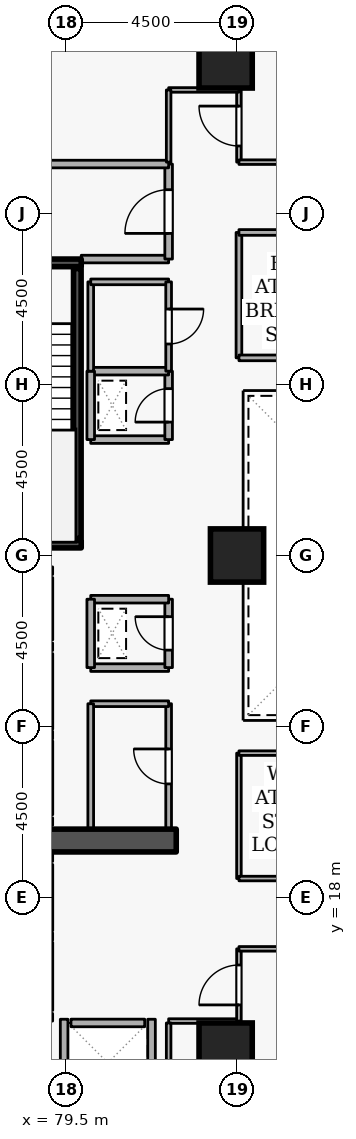
"""IFC4 building model, lengths in metres.
Left out: names, types, materials, properties, quantities, classifications, styles, units other than length and angle.
Written with IfcOpenShell. Run it as: python <this file> out.ifc"""

import sys

from ifc_helpers import new_model, si_unit, direction, frame, frame_2d, origin, origin_2d, place, context, subcontext, project, spatial, rectangle, extrude, element, fill, save


model = new_model("IFC4")
c1 = context("Model", 3, precision=1e-05, world=origin(), true_north=direction((0.0, 1.0)))
c2 = subcontext(c1, "Body", "Model", "MODEL_VIEW")
j1 = project(units=[si_unit("LENGTHUNIT", "METRE"), si_unit("PLANEANGLEUNIT", "RADIAN")], contexts=[c1])
p1 = place(None, origin())
s1 = spatial("IfcSite", under=j1, at=p1, CompositionType="ELEMENT")
p2 = place(p1, origin())
s2 = spatial("IfcBuilding", under=s1, at=p2, CompositionType="ELEMENT")
p3 = place(p2, frame((0.0, 0.0, 42.3)))
s3 = spatial("IfcBuildingStorey", under=s2, at=p3, CompositionType="ELEMENT", Elevation=42.3)
p4 = place(p3, frame((76.7, 19.5, 0.0), z_axis=(0.0, 0.0, 1.0), x_axis=(1.0, 0.0, 0.0)))
e1 = element("IfcWall", 1, at=p4, inside=s3, PredefinedType="SHEAR", context=c2, shape_type="SweptSolid", body=[
    extrude(rectangle(XDim=5.7, YDim=0.6, at=frame_2d((2.85, 0.0))), origin(), (0.0, 0.0, 1.0), 3.6),
])
for number, where, z_axis, x_axis in (
    (2, (83.7, 14.0, 0.0), (0.0, 0.0, 1.0), (1.0, 0.0, 0.0)),
    (3, (83.7, 40.0, 0.0), (0.0, 0.0, 1.0), (1.0, 0.0, 0.0)),
    (4, (84.0, 27.0, 0.0), (0.0, 0.0, 1.0), (1.0, 0.0, 0.0)),
):
    element("IfcColumn", number, at=place(p3, frame(where, z_axis=z_axis, x_axis=x_axis)), inside=s3, PredefinedType="COLUMN", context=c2, shape_type="SweptSolid", body=[
        extrude(rectangle(XDim=1.4, YDim=1.4, at=origin_2d()), origin(), (0.0, 0.0, 1.0), 3.6),
    ])
p5 = place(p3, frame((79.05, 24.78, 0.0), z_axis=(0.0, 0.0, 1.0), x_axis=(0.0, 1.0, 0.0)))
e5 = element("IfcWall", 5, at=p5, inside=s3, PredefinedType="STANDARD", context=c2, shape_type="SweptSolid", body=[
    extrude(rectangle(XDim=1.64, YDim=0.2, at=frame_2d((0.82, 0.0))), origin(), (0.0, 0.0, 1.0), 3.34),
])
p6 = place(p5, frame((0.31, 0.0, 0.0)))
e6 = element("IfcOpeningElement", 6, at=p6, cuts=e5, PredefinedType="OPENING", context=c2, shape_type="SweptSolid", body=[
    extrude(rectangle(XDim=1.02, YDim=2.06, at=frame_2d((0.51, 1.03))), frame((0.0, 0.11, 0.0), z_axis=(0.0, -1.0, 0.0), x_axis=(1.0, 0.0, 0.0)), (0.0, 0.0, 1.0), 0.22),
])
p7 = place(p3, frame((79.05, 22.43, 0.0), z_axis=(0.0, 0.0, 1.0), x_axis=(0.0, 1.0, 0.0)))
e7 = element("IfcWall", 7, at=p7, inside=s3, PredefinedType="STANDARD", context=c2, shape_type="SweptSolid", body=[
    extrude(rectangle(XDim=1.99, YDim=0.2, at=frame_2d((0.995, 0.0))), origin(), (0.0, 0.0, 1.0), 3.34),
])
p8 = place(p3, frame((79.05, 20.18, 0.0), z_axis=(0.0, 0.0, 1.0), x_axis=(0.0, 1.0, 0.0)))
e8 = element("IfcWall", 8, at=p8, inside=s3, PredefinedType="STANDARD", context=c2, shape_type="SweptSolid", body=[
    extrude(rectangle(XDim=1.94, YDim=0.2, at=frame_2d((0.97, 0.0))), origin(), (0.0, 0.0, 1.0), 3.34),
])
p9 = place(p3, frame((79.05, 17.13, 0.0), z_axis=(0.0, 0.0, 1.0), x_axis=(0.0, 1.0, 0.0)))
e9 = element("IfcWall", 9, at=p9, inside=s3, PredefinedType="STANDARD", context=c2, shape_type="SweptSolid", body=[
    extrude(rectangle(XDim=1.74, YDim=0.2, at=frame_2d((0.87, 0.0))), origin(), (0.0, 0.0, 1.0), 3.34),
])
p10 = place(p3, frame((79.05, 15.03, 0.0), z_axis=(0.0, 0.0, 1.0), x_axis=(0.0, 1.0, 0.0)))
e10 = element("IfcWall", 10, at=p10, inside=s3, PredefinedType="STANDARD", context=c2, shape_type="SweptSolid", body=[
    extrude(rectangle(XDim=1.79, YDim=0.2, at=frame_2d((0.895, 0.0))), origin(), (0.0, 0.0, 1.0), 3.34),
])
p11 = place(p3, frame((79.63, 14.7, 0.0), z_axis=(0.0, 0.0, 1.0), x_axis=(1.0, 0.0, 0.0)))
e11 = element("IfcWall", 11, at=p11, inside=s3, PredefinedType="STANDARD", context=c2, shape_type="SweptSolid", body=[
    extrude(rectangle(XDim=1.94, YDim=0.2, at=frame_2d((0.97, 0.0))), origin(), (0.0, 0.0, 1.0), 3.34),
])
for number, where, z_axis, x_axis in (
    (12, (81.75, 12.612, 0.0), (0.0, 0.0, 1.0), (0.0, 1.0, 0.0)),
    (13, (79.45, 12.612, 0.0), (0.0, 0.0, 1.0), (0.0, 1.0, 0.0)),
):
    element("IfcWall", number, at=place(p3, frame(where, z_axis=z_axis, x_axis=x_axis)), inside=s3, PredefinedType="STANDARD", context=c2, shape_type="SweptSolid", body=[
        extrude(rectangle(XDim=2.186, YDim=0.2, at=frame_2d((1.093, 0.0))), origin(), (0.0, 0.0, 1.0), 3.34),
    ])
p12 = place(p3, frame((76.55, 34.7, 0.0), z_axis=(0.0, 0.0, 1.0), x_axis=(1.0, 0.0, 0.0)))
e14 = element("IfcWall", 14, at=p12, inside=s3, PredefinedType="SHEAR", context=c2, shape_type="SweptSolid", body=[
    extrude(rectangle(XDim=3.35, YDim=0.2, at=frame_2d((1.675, 0.0))), origin(), (0.0, 0.0, 1.0), 3.6),
])
p13 = place(p12, frame((1.125, 0.0, 0.0)))
e15 = element("IfcOpeningElement", 15, at=p13, cuts=e14, PredefinedType="OPENING", context=c2, shape_type="SweptSolid", body=[
    extrude(rectangle(XDim=1.1, YDim=2.1, at=frame_2d((0.55, 1.05))), frame((0.0, 0.11, 0.0), z_axis=(0.0, -1.0, 0.0), x_axis=(1.0, 0.0, 0.0)), (0.0, 0.0, 1.0), 0.22),
])
p14 = place(p3, frame((79.9, 27.3, 0.0), z_axis=(0.0, 0.0, 1.0), x_axis=(-1.0, 0.0, 0.0)))
e16 = element("IfcWall", 16, at=p14, inside=s3, PredefinedType="SHEAR", context=c2, shape_type="SweptSolid", body=[
    extrude(rectangle(XDim=3.35, YDim=0.2, at=frame_2d((1.675, 0.0))), origin(), (0.0, 0.0, 1.0), 3.6),
])
p15 = place(p3, frame((79.797, 27.45, 0.0), z_axis=(0.0, 0.0, 1.0), x_axis=(0.0, 1.0, 0.0)))
e17 = element("IfcWall", 17, at=p15, inside=s3, PredefinedType="SHEAR", context=c2, shape_type="SweptSolid", body=[
    extrude(rectangle(XDim=7.1, YDim=0.2, at=frame_2d((3.55, 0.0))), origin(), (0.0, 0.0, 1.0), 3.6),
])
p16 = place(p3, frame((79.9, 34.8, 0.0), z_axis=(0.0, 0.0, 1.0), x_axis=(1.0, 0.0, 0.0)))
e18 = element("IfcWall", 18, at=p16, inside=s3, PredefinedType="STANDARD", context=c2, shape_type="SweptSolid", body=[
    extrude(rectangle(XDim=2.3, YDim=0.2, at=frame_2d((1.15, 0.0))), origin(), (0.0, 0.0, 1.0), 2.545),
])
p17 = place(p3, frame((82.2, 34.8, 0.0), z_axis=(0.0, 0.0, 1.0), x_axis=(0.0, 1.0, 0.0)))
e19 = element("IfcWall", 19, at=p17, inside=s3, PredefinedType="STANDARD", context=c2, shape_type="SweptSolid", body=[
    extrude(rectangle(XDim=2.5, YDim=0.2, at=frame_2d((1.25, 0.0))), origin(), (0.0, 0.0, 1.0), 3.34),
])
p18 = place(p17, frame((0.675, 0.0, 0.0)))
e20 = element("IfcOpeningElement", 20, at=p18, cuts=e19, PredefinedType="OPENING", context=c2, shape_type="SweptSolid", body=[
    extrude(rectangle(XDim=1.15, YDim=2.1, at=frame_2d((0.575, 1.05))), frame((0.0, 0.11, 0.0), z_axis=(0.0, -1.0, 0.0), x_axis=(1.0, 0.0, 0.0)), (0.0, 0.0, 1.0), 0.22),
])
p19 = place(p3, frame((82.2, 37.3, 0.0), z_axis=(0.0, 0.0, 1.0), x_axis=(-1.0, 0.0, 0.0)))
e21 = element("IfcWall", 21, at=p19, inside=s3, PredefinedType="STANDARD", context=c2, shape_type="SweptSolid", body=[
    extrude(rectangle(XDim=5.7, YDim=0.2, at=frame_2d((2.85, 0.0))), origin(), (0.0, 0.0, 1.0), 3.34),
])
p20 = place(p3, frame((80.15, 24.05, 0.0), z_axis=(0.0, 0.0, 1.0), x_axis=(1.0, 0.0, 0.0)))
e22 = element("IfcWall", 22, at=p20, inside=s3, PredefinedType="STANDARD", context=c2, shape_type="SweptSolid", body=[
    extrude(rectangle(XDim=2.05, YDim=0.2, at=frame_2d((1.025, 0.0))), origin(), (0.0, 0.0, 1.0), 3.34),
])
p21 = place(p3, frame((82.2, 24.05, 0.0), z_axis=(0.0, 0.0, 1.0), x_axis=(0.0, 1.0, 0.0)))
e23 = element("IfcWall", 23, at=p21, inside=s3, PredefinedType="STANDARD", context=c2, shape_type="SweptSolid", body=[
    extrude(rectangle(XDim=1.8, YDim=0.2, at=frame_2d((0.9, 0.0))), origin(), (0.0, 0.0, 1.0), 3.34),
])
p22 = place(p21, frame((0.46, 0.0, 0.0)))
e24 = element("IfcOpeningElement", 24, at=p22, cuts=e23, PredefinedType="OPENING", context=c2, shape_type="SweptSolid", body=[
    extrude(rectangle(XDim=0.88, YDim=2.04, at=frame_2d((0.44, 1.02))), frame((0.0, 0.11, 0.0), z_axis=(0.0, -1.0, 0.0), x_axis=(1.0, 0.0, 0.0)), (0.0, 0.0, 1.0), 0.22),
])
p23 = place(p3, frame((82.2, 25.85, 0.0), z_axis=(0.0, 0.0, 1.0), x_axis=(-1.0, 0.0, 0.0)))
e25 = element("IfcWall", 25, at=p23, inside=s3, PredefinedType="STANDARD", context=c2, shape_type="SweptSolid", body=[
    extrude(rectangle(XDim=2.05, YDim=0.2, at=frame_2d((1.025, 0.0))), origin(), (0.0, 0.0, 1.0), 3.34),
])
p24 = place(p3, frame((80.15, 25.85, 0.0), z_axis=(0.0, 0.0, 1.0), x_axis=(0.0, -1.0, 0.0)))
e26 = element("IfcWall", 26, at=p24, inside=s3, PredefinedType="STANDARD", context=c2, shape_type="SweptSolid", body=[
    extrude(rectangle(XDim=1.8, YDim=0.2, at=frame_2d((0.9, 0.0))), origin(), (0.0, 0.0, 1.0), 3.34),
])
p25 = place(p3, frame((80.15, 30.05, 0.0), z_axis=(0.0, 0.0, 1.0), x_axis=(1.0, 0.0, 0.0)))
e27 = element("IfcWall", 27, at=p25, inside=s3, PredefinedType="STANDARD", context=c2, shape_type="SweptSolid", body=[
    extrude(rectangle(XDim=2.05, YDim=0.2, at=frame_2d((1.025, 0.0))), origin(), (0.0, 0.0, 1.0), 3.34),
])
p26 = place(p3, frame((82.2, 30.05, 0.0), z_axis=(0.0, 0.0, 1.0), x_axis=(0.0, 1.0, 0.0)))
e28 = element("IfcWall", 28, at=p26, inside=s3, PredefinedType="STANDARD", context=c2, shape_type="SweptSolid", body=[
    extrude(rectangle(XDim=1.8, YDim=0.2, at=frame_2d((0.9, 0.0))), origin(), (0.0, 0.0, 1.0), 3.34),
])
p27 = place(p26, frame((0.46, 0.0, 0.0)))
e29 = element("IfcOpeningElement", 29, at=p27, cuts=e28, PredefinedType="OPENING", context=c2, shape_type="SweptSolid", body=[
    extrude(rectangle(XDim=0.88, YDim=2.04, at=frame_2d((0.44, 1.02))), frame((0.0, 0.11, 0.0), z_axis=(0.0, -1.0, 0.0), x_axis=(1.0, 0.0, 0.0)), (0.0, 0.0, 1.0), 0.22),
])
p28 = place(p3, frame((82.2, 31.85, 0.0), z_axis=(0.0, 0.0, 1.0), x_axis=(-1.0, 0.0, 0.0)))
e30 = element("IfcWall", 30, at=p28, inside=s3, PredefinedType="STANDARD", context=c2, shape_type="SweptSolid", body=[
    extrude(rectangle(XDim=2.05, YDim=0.2, at=frame_2d((1.025, 0.0))), origin(), (0.0, 0.0, 1.0), 3.34),
])
p29 = place(p3, frame((80.15, 31.85, 0.0), z_axis=(0.0, 0.0, 1.0), x_axis=(0.0, -1.0, 0.0)))
e31 = element("IfcWall", 31, at=p29, inside=s3, PredefinedType="STANDARD", context=c2, shape_type="SweptSolid", body=[
    extrude(rectangle(XDim=1.8, YDim=0.2, at=frame_2d((0.9, 0.0))), origin(), (0.0, 0.0, 1.0), 3.34),
])
p30 = place(p3, frame((82.2, 19.8, 0.0), z_axis=(0.0, 0.0, 1.0), x_axis=(0.0, 1.0, 0.0)))
e32 = element("IfcWall", 32, at=p30, inside=s3, PredefinedType="PARTITIONING", context=c2, shape_type="SweptSolid", body=[
    extrude(rectangle(XDim=3.3, YDim=0.15, at=frame_2d((1.65, 0.0))), origin(), (0.0, 0.0, 1.0), 3.34),
])
p31 = place(p30, frame((1.19, 0.0, 0.0)))
e33 = element("IfcOpeningElement", 33, at=p31, cuts=e32, PredefinedType="OPENING", context=c2, shape_type="SweptSolid", body=[
    extrude(rectangle(XDim=0.92, YDim=2.08, at=frame_2d((0.46, 1.04))), frame((0.0, 0.085, 0.0), z_axis=(0.0, -1.0, 0.0), x_axis=(1.0, 0.0, 0.0)), (0.0, 0.0, 1.0), 0.17),
])
p32 = place(p3, frame((82.2, 23.1, 0.0), z_axis=(0.0, 0.0, 1.0), x_axis=(-1.0, 0.0, 0.0)))
e34 = element("IfcWall", 34, at=p32, inside=s3, PredefinedType="PARTITIONING", context=c2, shape_type="SweptSolid", body=[
    extrude(rectangle(XDim=2.05, YDim=0.15, at=frame_2d((1.025, 0.0))), origin(), (0.0, 0.0, 1.0), 3.34),
])
p33 = place(p3, frame((80.15, 23.1, 0.0), z_axis=(0.0, 0.0, 1.0), x_axis=(0.0, -1.0, 0.0)))
e35 = element("IfcWall", 35, at=p33, inside=s3, PredefinedType="PARTITIONING", context=c2, shape_type="SweptSolid", body=[
    extrude(rectangle(XDim=3.3, YDim=0.15, at=frame_2d((1.65, 0.0))), origin(), (0.0, 0.0, 1.0), 3.34),
])
p34 = place(p3, frame((80.15, 31.85, 0.0), z_axis=(0.0, 0.0, 1.0), x_axis=(0.0, 1.0, 0.0)))
e36 = element("IfcWall", 36, at=p34, inside=s3, PredefinedType="PARTITIONING", context=c2, shape_type="SweptSolid", body=[
    extrude(rectangle(XDim=2.35, YDim=0.15, at=frame_2d((1.175, 0.0))), origin(), (0.0, 0.0, 1.0), 3.34),
])
p35 = place(p3, frame((80.15, 34.2, 0.0), z_axis=(0.0, 0.0, 1.0), x_axis=(1.0, 0.0, 0.0)))
e37 = element("IfcWall", 37, at=p35, inside=s3, PredefinedType="PARTITIONING", context=c2, shape_type="SweptSolid", body=[
    extrude(rectangle(XDim=2.05, YDim=0.15, at=frame_2d((1.025, 0.0))), origin(), (0.0, 0.0, 1.0), 2.545),
])
p36 = place(p3, frame((82.2, 34.2, 0.0), z_axis=(0.0, 0.0, 1.0), x_axis=(0.0, -1.0, 0.0)))
e38 = element("IfcWall", 38, at=p36, inside=s3, PredefinedType="PARTITIONING", context=c2, shape_type="SweptSolid", body=[
    extrude(rectangle(XDim=2.35, YDim=0.15, at=frame_2d((1.175, 0.0))), origin(), (0.0, 0.0, 1.0), 3.34),
])
p37 = place(p36, frame((0.715, 0.0, 0.0)))
e39 = element("IfcOpeningElement", 39, at=p37, cuts=e38, PredefinedType="OPENING", context=c2, shape_type="SweptSolid", body=[
    extrude(rectangle(XDim=0.92, YDim=2.08, at=frame_2d((0.46, 1.04))), frame((0.0, 0.085, 0.0), z_axis=(0.0, -1.0, 0.0), x_axis=(1.0, 0.0, 0.0)), (0.0, 0.0, 1.0), 0.17),
])
p38 = place(p3, frame((82.2, 14.75, 0.0), z_axis=(0.0, 0.0, 1.0), x_axis=(1.0, 0.0, 0.0)))
e40 = element("IfcWall", 40, at=p38, inside=s3, PredefinedType="PARTITIONING", context=c2, shape_type="SweptSolid", body=[
    extrude(rectangle(XDim=1.85, YDim=0.12, at=frame_2d((0.925, 0.0))), origin(), (0.0, 0.0, 1.0), 3.34),
])
p39 = place(p3, frame((84.05, 14.75, 0.0), z_axis=(0.0, 0.0, 1.0), x_axis=(0.0, 1.0, 0.0)))
e41 = element("IfcWall", 41, at=p39, inside=s3, PredefinedType="PARTITIONING", context=c2, shape_type="SweptSolid", body=[
    extrude(rectangle(XDim=1.9, YDim=0.12, at=frame_2d((0.95, 0.0))), origin(), (0.0, 0.0, 1.0), 3.34),
])
p40 = place(p39, frame((0.425, 0.0, 0.0)))
e42 = element("IfcOpeningElement", 42, at=p40, cuts=e41, PredefinedType="OPENING", context=c2, shape_type="SweptSolid", body=[
    extrude(rectangle(XDim=1.05, YDim=2.1, at=frame_2d((0.525, 1.05))), frame((0.0, 0.07, 0.0), z_axis=(0.0, -1.0, 0.0), x_axis=(1.0, 0.0, 0.0)), (0.0, 0.0, 1.0), 0.14),
])
p41 = place(p3, frame((84.05, 16.65, 0.0), z_axis=(0.0, 0.0, 1.0), x_axis=(1.0, 0.0, 0.0)))
e43 = element("IfcWall", 43, at=p41, inside=s3, PredefinedType="PARTITIONING", context=c2, shape_type="SweptSolid", body=[
    extrude(rectangle(XDim=1.3, YDim=0.12, at=frame_2d((0.65, 0.0))), origin(), (0.0, 0.0, 1.0), 3.34),
])
p42 = place(p3, frame((82.2, 12.4, 0.0), z_axis=(0.0, 0.0, 1.0), x_axis=(0.0, 1.0, 0.0)))
e44 = element("IfcWall", 44, at=p42, inside=s3, PredefinedType="PARTITIONING", context=c2, shape_type="SweptSolid", body=[
    extrude(rectangle(XDim=2.3, YDim=0.12, at=frame_2d((1.15, 0.0))), origin(), (0.0, 0.0, 1.0), 3.34),
])
p43 = place(p3, frame((84.05, 37.35, 0.0), z_axis=(0.0, 0.0, 1.0), x_axis=(0.0, 1.0, 0.0)))
e45 = element("IfcWall", 45, at=p43, inside=s3, PredefinedType="PARTITIONING", context=c2, shape_type="SweptSolid", body=[
    extrude(rectangle(XDim=1.9, YDim=0.12, at=frame_2d((0.95, 0.0))), origin(), (0.0, 0.0, 1.0), 3.34),
])
p44 = place(p43, frame((0.425, 0.0, 0.0)))
e46 = element("IfcOpeningElement", 46, at=p44, cuts=e45, PredefinedType="OPENING", context=c2, shape_type="SweptSolid", body=[
    extrude(rectangle(XDim=1.05, YDim=2.1, at=frame_2d((0.525, 1.05))), frame((0.0, 0.07, 0.0), z_axis=(0.0, -1.0, 0.0), x_axis=(1.0, 0.0, 0.0)), (0.0, 0.0, 1.0), 0.14),
])
p45 = place(p3, frame((84.05, 39.25, 0.0), z_axis=(0.0, 0.0, 1.0), x_axis=(-1.0, 0.0, 0.0)))
e47 = element("IfcWall", 47, at=p45, inside=s3, PredefinedType="PARTITIONING", context=c2, shape_type="SweptSolid", body=[
    extrude(rectangle(XDim=1.85, YDim=0.12, at=frame_2d((0.925, 0.0))), origin(), (0.0, 0.0, 1.0), 3.34),
])
p46 = place(p3, frame((82.2, 39.25, 0.0), z_axis=(0.0, 0.0, 1.0), x_axis=(0.0, -1.0, 0.0)))
e48 = element("IfcWall", 48, at=p46, inside=s3, PredefinedType="PARTITIONING", context=c2, shape_type="SweptSolid", body=[
    extrude(rectangle(XDim=1.9, YDim=0.12, at=frame_2d((0.95, 0.0))), origin(), (0.0, 0.0, 1.0), 3.34),
])
p47 = place(p3, frame((85.35, 37.35, 0.0), z_axis=(0.0, 0.0, 1.0), x_axis=(-1.0, 0.0, 0.0)))
e49 = element("IfcWall", 49, at=p47, inside=s3, PredefinedType="PARTITIONING", context=c2, shape_type="SweptSolid", body=[
    extrude(rectangle(XDim=1.3, YDim=0.12, at=frame_2d((0.65, 0.0))), origin(), (0.0, 0.0, 1.0), 3.34),
])
p48 = place(p3, frame((84.05, 32.2, 0.0), z_axis=(0.0, 0.0, 1.0), x_axis=(0.0, 1.0, 0.0)))
e50 = element("IfcWall", 50, at=p48, inside=s3, PredefinedType="PARTITIONING", context=c2, shape_type="SweptSolid", body=[
    extrude(rectangle(XDim=3.3, YDim=0.15, at=frame_2d((1.65, 0.0))), origin(), (0.0, 0.0, 1.0), 3.34),
])
p49 = place(p3, frame((84.05, 35.5, 0.0), z_axis=(0.0, 0.0, 1.0), x_axis=(1.0, 0.0, 0.0)))
e51 = element("IfcWall", 51, at=p49, inside=s3, PredefinedType="PARTITIONING", context=c2, shape_type="SweptSolid", body=[
    extrude(rectangle(XDim=8.9, YDim=0.15, at=frame_2d((4.45, 0.0))), origin(), (0.0, 0.0, 1.0), 3.34),
])
p50 = place(p49, frame((3.8, 0.0, 0.0)))
e52 = element("IfcOpeningElement", 52, at=p50, cuts=e51, PredefinedType="OPENING", context=c2, shape_type="SweptSolid", body=[
    extrude(rectangle(XDim=1.3, YDim=2.12, at=frame_2d((0.65, 1.06))), frame((0.0, 0.085, 0.0), z_axis=(0.0, -1.0, 0.0), x_axis=(1.0, 0.0, 0.0)), (0.0, 0.0, 1.0), 0.17),
])
p51 = place(p3, frame((92.95, 32.2, 0.0), z_axis=(0.0, 0.0, 1.0), x_axis=(-1.0, 0.0, 0.0)))
e53 = element("IfcWall", 53, at=p51, inside=s3, PredefinedType="PARTITIONING", context=c2, shape_type="SweptSolid", body=[
    extrude(rectangle(XDim=8.9, YDim=0.15, at=frame_2d((4.45, 0.0))), origin(), (0.0, 0.0, 1.0), 3.34),
])
p52 = place(p3, frame((84.05, 18.5, 0.0), z_axis=(0.0, 0.0, 1.0), x_axis=(0.0, 1.0, 0.0)))
e54 = element("IfcWall", 54, at=p52, inside=s3, PredefinedType="PARTITIONING", context=c2, shape_type="SweptSolid", body=[
    extrude(rectangle(XDim=3.3, YDim=0.12, at=frame_2d((1.65, 0.0))), origin(), (0.0, 0.0, 1.0), 3.34),
])
p53 = place(p3, frame((84.05, 21.8, 0.0), z_axis=(0.0, 0.0, 1.0), x_axis=(1.0, 0.0, 0.0)))
e55 = element("IfcWall", 55, at=p53, inside=s3, PredefinedType="PARTITIONING", context=c2, shape_type="SweptSolid", body=[
    extrude(rectangle(XDim=8.9, YDim=0.12, at=frame_2d((4.45, 0.0))), origin(), (0.0, 0.0, 1.0), 3.34),
])
p54 = place(p3, frame((92.95, 18.5, 0.0), z_axis=(0.0, 0.0, 1.0), x_axis=(-1.0, 0.0, 0.0)))
e56 = element("IfcWall", 56, at=p54, inside=s3, PredefinedType="PARTITIONING", context=c2, shape_type="SweptSolid", body=[
    extrude(rectangle(XDim=8.9, YDim=0.12, at=frame_2d((4.45, 0.0))), origin(), (0.0, 0.0, 1.0), 3.34),
])
p55 = place(p54, frame((3.975, 0.0, 0.0)))
e57 = element("IfcOpeningElement", 57, at=p55, cuts=e56, PredefinedType="OPENING", context=c2, shape_type="SweptSolid", body=[
    extrude(rectangle(XDim=0.95, YDim=2.1, at=frame_2d((0.475, 1.05))), frame((0.0, 0.07, 0.0), z_axis=(0.0, -1.0, 0.0), x_axis=(1.0, 0.0, 0.0)), (0.0, 0.0, 1.0), 0.14),
])
p56 = place(p18, origin())
e58 = element("IfcDoor", 58, at=p56, inside=s3, OperationType="SINGLE_SWING_LEFT", PredefinedType="DOOR", context=c2, shape_type="SweptSolid", body=[
    extrude(rectangle(XDim=1.15, YDim=2.1, at=frame_2d((0.575, 1.05))), frame((0.0, 0.025, 0.0), z_axis=(0.0, -1.0, 0.0), x_axis=(1.0, 0.0, 0.0)), (0.0, 0.0, 1.0), 0.05),
])
fill(e20, e58)
p57 = place(p22, origin())
e59 = element("IfcDoor", 59, at=p57, inside=s3, OperationType="SINGLE_SWING_RIGHT", PredefinedType="DOOR", context=c2, shape_type="SweptSolid", body=[
    extrude(rectangle(XDim=0.88, YDim=2.04, at=frame_2d((0.44, 1.02))), frame((0.0, 0.025, 0.0), z_axis=(0.0, -1.0, 0.0), x_axis=(1.0, 0.0, 0.0)), (0.0, 0.0, 1.0), 0.05),
])
fill(e24, e59)
p58 = place(p27, origin())
e60 = element("IfcDoor", 60, at=p58, inside=s3, OperationType="SINGLE_SWING_LEFT", PredefinedType="DOOR", context=c2, shape_type="SweptSolid", body=[
    extrude(rectangle(XDim=0.88, YDim=2.04, at=frame_2d((0.44, 1.02))), frame((0.0, 0.025, 0.0), z_axis=(0.0, -1.0, 0.0), x_axis=(1.0, 0.0, 0.0)), (0.0, 0.0, 1.0), 0.05),
])
fill(e29, e60)
p59 = place(p31, origin())
e61 = element("IfcDoor", 61, at=p59, inside=s3, OperationType="SINGLE_SWING_RIGHT", PredefinedType="DOOR", context=c2, shape_type="SweptSolid", body=[
    extrude(rectangle(XDim=0.92, YDim=2.08, at=frame_2d((0.46, 1.04))), frame((0.0, 0.025, 0.0), z_axis=(0.0, -1.0, 0.0), x_axis=(1.0, 0.0, 0.0)), (0.0, 0.0, 1.0), 0.05),
])
fill(e33, e61)
p60 = place(p37, origin())
e62 = element("IfcDoor", 62, at=p60, inside=s3, OperationType="SINGLE_SWING_LEFT", PredefinedType="DOOR", context=c2, shape_type="SweptSolid", body=[
    extrude(rectangle(XDim=0.92, YDim=2.08, at=frame_2d((0.46, 1.04))), frame((0.0, 0.025, 0.0), z_axis=(0.0, -1.0, 0.0), x_axis=(1.0, 0.0, 0.0)), (0.0, 0.0, 1.0), 0.05),
])
fill(e39, e62)
p61 = place(p40, origin())
e63 = element("IfcDoor", 63, at=p61, inside=s3, OperationType="SINGLE_SWING_LEFT", PredefinedType="DOOR", context=c2, shape_type="SweptSolid", body=[
    extrude(rectangle(XDim=1.05, YDim=2.1, at=frame_2d((0.525, 1.05))), frame((0.0, 0.025, 0.0), z_axis=(0.0, -1.0, 0.0), x_axis=(1.0, 0.0, 0.0)), (0.0, 0.0, 1.0), 0.05),
])
fill(e42, e63)
p62 = place(p44, origin())
e64 = element("IfcDoor", 64, at=p62, inside=s3, OperationType="SINGLE_SWING_RIGHT", PredefinedType="DOOR", context=c2, shape_type="SweptSolid", body=[
    extrude(rectangle(XDim=1.05, YDim=2.1, at=frame_2d((0.525, 1.05))), frame((0.0, 0.025, 0.0), z_axis=(0.0, -1.0, 0.0), x_axis=(1.0, 0.0, 0.0)), (0.0, 0.0, 1.0), 0.05),
])
fill(e46, e64)
save(model, sys.argv[1])
